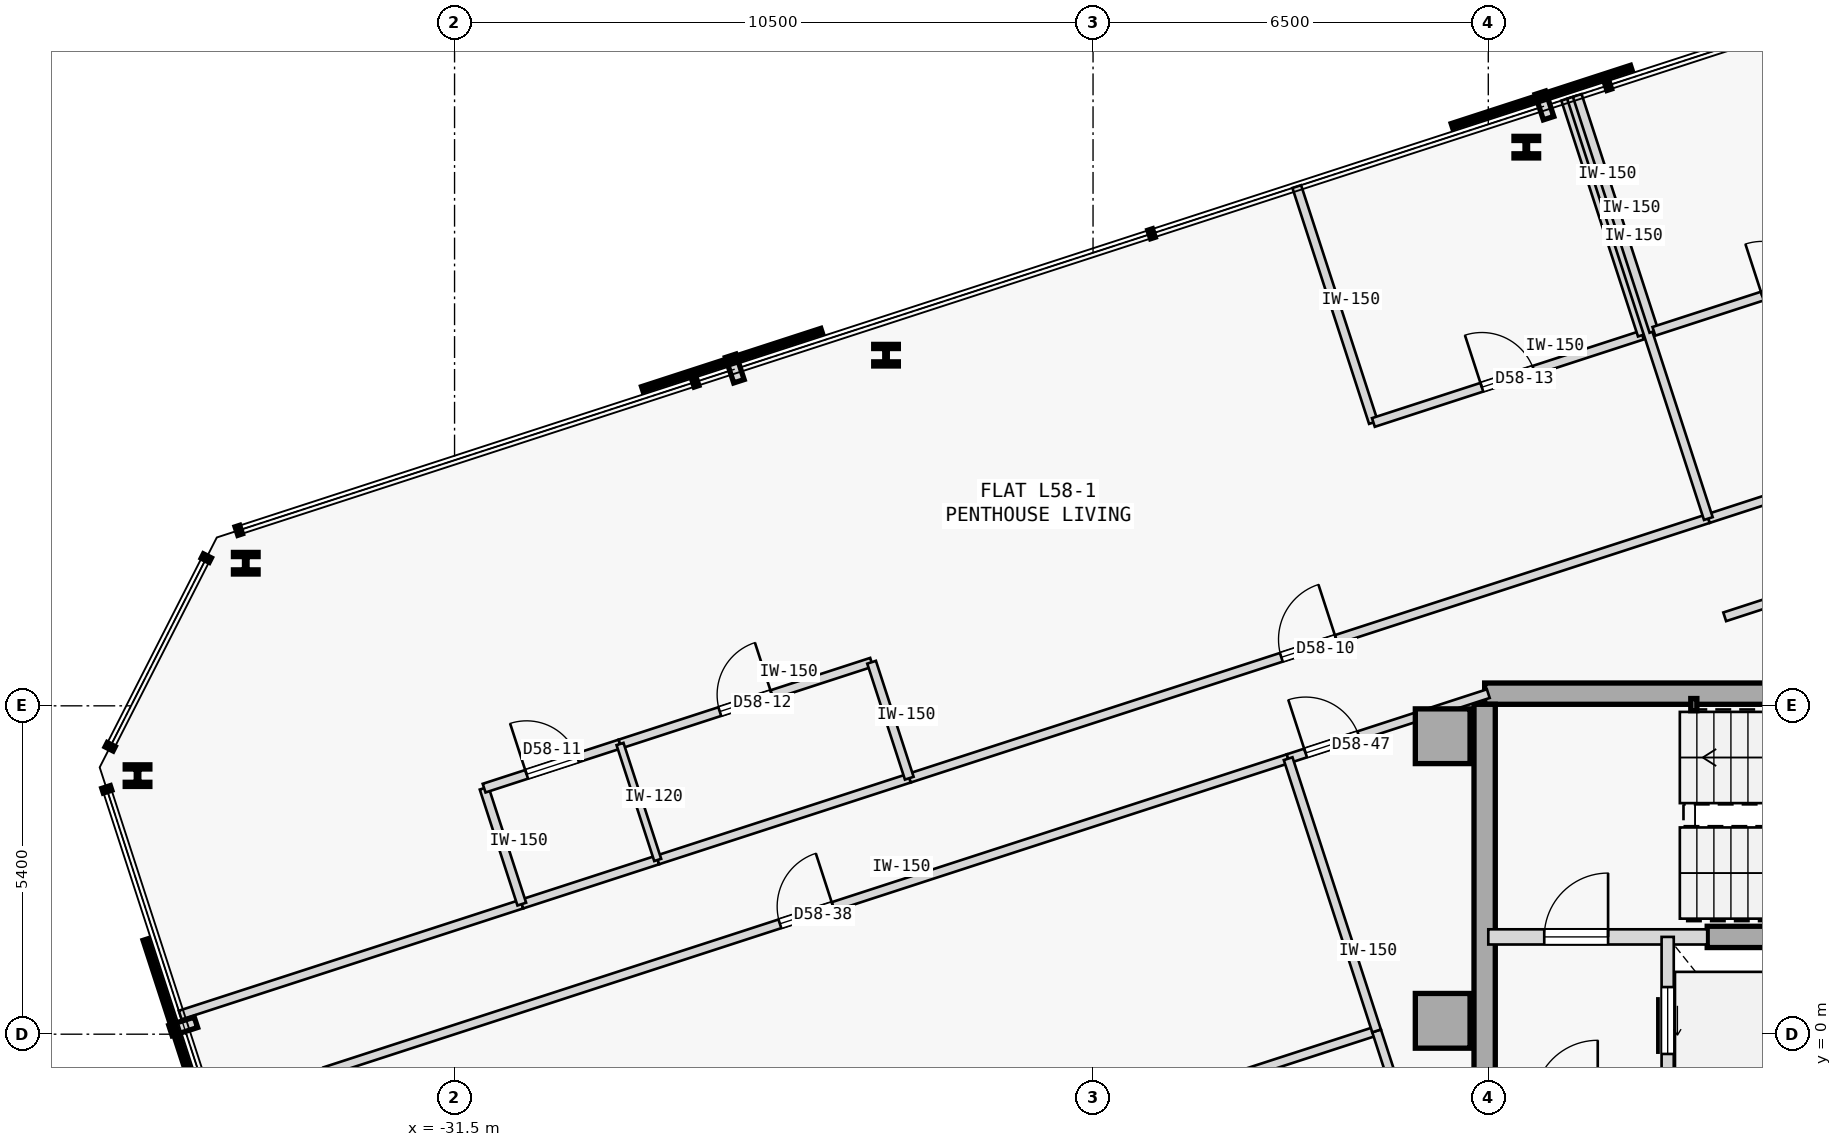
"""IFC4 building model, lengths in metres.
Left out: names, types, materials, properties, quantities, classifications, styles, units other than length and angle.
Written with IfcOpenShell. Run it as: python <this file> out.ifc"""

import sys

from ifc_helpers import new_model, si_unit, direction, frame, frame_2d, origin, origin_2d, place, context, subcontext, project, spatial, rectangle, hollow_rectangle, i_section, extrude, element, fill, save


model = new_model("IFC4")
c1 = context("Model", 3, precision=1e-05, world=origin(), true_north=direction((0.0, 1.0)))
c2 = subcontext(c1, "Body", "Model", "MODEL_VIEW")
j1 = project(units=[si_unit("LENGTHUNIT", "METRE"), si_unit("PLANEANGLEUNIT", "RADIAN")], contexts=[c1])
p1 = place(None, origin())
s1 = spatial("IfcSite", under=j1, at=p1, CompositionType="ELEMENT")
p2 = place(p1, origin())
s2 = spatial("IfcBuilding", under=s1, at=p2, CompositionType="ELEMENT")
p3 = place(p2, frame((0.0, 0.0, 220.95)))
s3 = spatial("IfcBuildingStorey", under=s2, at=p3, CompositionType="ELEMENT", Elevation=220.95)
for number, where, z_axis, x_axis in (
    (1, (-15.25, 4.9, 0.0), (0.0, 0.0, 1.0), (1.0, 0.0, 0.0)),
    (2, (-15.25, 0.22, 0.0), (0.0, 0.0, 1.0), (1.0, 0.0, 0.0)),
):
    element("IfcColumn", number, at=place(p3, frame(where, z_axis=z_axis, x_axis=x_axis)), inside=s3, PredefinedType="COLUMN", context=c2, shape_type="SweptSolid", body=[
        extrude(rectangle(XDim=0.9, YDim=0.9, at=origin_2d()), origin(), (0.0, 0.0, 1.0), 3.35),
    ])
p4 = place(p3, frame((-14.56, 5.6, 0.0), z_axis=(0.0, 0.0, 1.0), x_axis=(1.0, 0.0, 0.0)))
e3 = element("IfcWall", 3, at=p4, inside=s3, PredefinedType="SHEAR", context=c2, shape_type="SweptSolid", body=[
    extrude(rectangle(XDim=11.41, YDim=0.35, at=frame_2d((5.705, 0.0))), origin(), (0.0, 0.0, 1.0), 3.125),
])
p5 = place(p3, frame((-14.56, -5.425, 0.0), z_axis=(0.0, 0.0, 1.0), x_axis=(0.0, 1.0, 0.0)))
e4 = element("IfcWall", 4, at=p5, inside=s3, PredefinedType="SHEAR", context=c2, shape_type="SweptSolid", body=[
    extrude(rectangle(XDim=10.85, YDim=0.35, at=frame_2d((5.425, 0.0))), origin(), (0.0, 0.0, 1.0), 3.125),
])
p6 = place(p3, frame((-10.9, 1.6, 0.0), z_axis=(0.0, 0.0, 1.0), x_axis=(1.0, 0.0, 0.0)))
e5 = element("IfcWall", 5, at=p6, inside=s3, PredefinedType="SHEAR", context=c2, shape_type="SweptSolid", body=[
    extrude(rectangle(XDim=5.15, YDim=0.35, at=frame_2d((2.575, 0.0))), origin(), (0.0, 0.0, 1.0), 3.125),
])
p7 = place(p3, frame((-11.12, 5.42, 0.0), z_axis=(0.0, 0.0, 1.0), x_axis=(1.0, 0.0, 0.0)))
e6 = element("IfcColumn", 6, at=p7, inside=s3, PredefinedType="COLUMN", context=c2, shape_type="SweptSolid", body=[
    extrude(hollow_rectangle(XDim=0.1, YDim=0.2, WallThickness=0.008, at=origin_2d()), origin(), (0.0, 0.0, 1.0), 3.35),
])
for number, where, z_axis, x_axis in (
    (7, (-13.875, 14.587, 0.0), (0.0, 0.0, 1.0), (1.0, 0.0, 0.0)),
    (8, (-24.404, 11.166, 0.0), (0.0, 0.0, 1.0), (1.0, 0.0, 0.0)),
    (9, (-34.934, 7.745, 0.0), (0.0, 0.0, 1.0), (1.0, 0.0, 0.0)),
    (10, (-36.713, 4.252, 0.0), (0.0, 0.0, 1.0), (1.0, 0.0, 0.0)),
):
    element("IfcColumn", number, at=place(p3, frame(where, z_axis=z_axis, x_axis=x_axis)), inside=s3, PredefinedType="COLUMN", context=c2, shape_type="SweptSolid", body=[
        extrude(i_section(OverallWidth=0.405, OverallDepth=0.355, WebThickness=0.042, FlangeThickness=0.068, FilletRadius=0.015, at=origin_2d()), origin(), (0.0, 0.0, 1.0), 3.35),
    ])
p8 = place(p3, frame((-14.5, 1.6, 0.0), z_axis=(0.0, 0.0, 1.0), x_axis=(1.0, 0.0, 0.0)))
e11 = element("IfcWall", 11, at=p8, inside=s3, PredefinedType="STANDARD", context=c2, shape_type="SweptSolid", body=[
    extrude(rectangle(XDim=3.6, YDim=0.25, at=frame_2d((1.8, 0.0))), origin(), (0.0, 0.0, 1.0), 3.125),
])
p9 = place(p8, frame((0.92, 0.0, 0.0)))
e12 = element("IfcOpeningElement", 12, at=p9, cuts=e11, PredefinedType="OPENING", context=c2, shape_type="SweptSolid", body=[
    extrude(rectangle(XDim=1.05, YDim=2.15, at=frame_2d((0.525, 1.075))), frame((0.0, 0.135, 0.0), z_axis=(0.0, -1.0, 0.0), x_axis=(1.0, 0.0, 0.0)), (0.0, 0.0, 1.0), 0.27),
])
p10 = place(p3, frame((-11.55, -1.15, 0.0), z_axis=(0.0, 0.0, 1.0), x_axis=(0.0, 1.0, 0.0)))
e13 = element("IfcWall", 13, at=p10, inside=s3, PredefinedType="STANDARD", context=c2, shape_type="SweptSolid", body=[
    extrude(rectangle(XDim=2.75, YDim=0.2, at=frame_2d((1.375, 0.0))), origin(), (0.0, 0.0, 1.0), 3.125),
])
p11 = place(p10, frame((0.825, 0.0, 0.0)))
e14 = element("IfcOpeningElement", 14, at=p11, cuts=e13, PredefinedType="OPENING", context=c2, shape_type="SweptSolid", body=[
    extrude(rectangle(XDim=1.1, YDim=2.15, at=frame_2d((0.55, 1.075))), frame((0.0, 0.11, 0.0), z_axis=(0.0, -1.0, 0.0), x_axis=(1.0, 0.0, 0.0)), (0.0, 0.0, 1.0), 0.22),
])
p12 = place(p3, frame((-36.012, 0.314, 0.0), z_axis=(0.0, 0.0, 1.0), x_axis=(0.951065348244, 0.308989811111, 0.0)))
e15 = element("IfcWall", 15, at=p12, inside=s3, PredefinedType="PARTITIONING", context=c2, shape_type="SweptSolid", body=[
    extrude(rectangle(XDim=5.907, YDim=0.15, at=frame_2d((2.954, 0.0))), origin(), (0.0, 0.0, 1.0), 3.125),
])
p13 = place(p3, frame((-24.022, 4.21, 0.0), z_axis=(0.0, 0.0, 1.0), x_axis=(0.951058997127, 0.309009359055, 0.0)))
e16 = element("IfcWall", 16, at=p13, inside=s3, PredefinedType="PARTITIONING", context=c2, shape_type="SweptSolid", body=[
    extrude(rectangle(XDim=13.817, YDim=0.15, at=frame_2d((6.908, 0.0))), origin(), (0.0, 0.0, 1.0), 3.125),
])
p14 = place(p13, frame((6.434, 0.0, 0.0)))
e17 = element("IfcOpeningElement", 17, at=p14, cuts=e16, PredefinedType="OPENING", context=c2, shape_type="SweptSolid", body=[
    extrude(rectangle(XDim=0.95, YDim=2.15, at=frame_2d((0.475, 1.075))), frame((0.0, 0.085, 0.0), z_axis=(0.0, -1.0, 0.0), x_axis=(1.0, 0.0, 0.0)), (0.0, 0.0, 1.0), 0.17),
])
p15 = place(p3, frame((-30.394, 2.139, 0.0), z_axis=(0.0, 0.0, 1.0), x_axis=(0.951045519245, 0.309050837767, 0.0)))
e18 = element("IfcWall", 18, at=p15, inside=s3, PredefinedType="PARTITIONING", context=c2, shape_type="SweptSolid", body=[
    extrude(rectangle(XDim=2.35, YDim=0.15, at=frame_2d((1.175, 0.0))), origin(), (0.0, 0.0, 1.0), 3.125),
])
p16 = place(p3, frame((-28.159, 2.866, 0.0), z_axis=(0.0, 0.0, 1.0), x_axis=(0.951052627573, 0.309028962374, 0.0)))
e19 = element("IfcWall", 19, at=p16, inside=s3, PredefinedType="PARTITIONING", context=c2, shape_type="SweptSolid", body=[
    extrude(rectangle(XDim=4.35, YDim=0.15, at=frame_2d((2.175, 0.0))), origin(), (0.0, 0.0, 1.0), 3.125),
])
p17 = place(p3, frame((-10.882, 8.479, 0.0), z_axis=(0.0, 0.0, 1.0), x_axis=(0.951051887333, 0.309031240494, 0.0)))
e20 = element("IfcWall", 20, at=p17, inside=s3, PredefinedType="PARTITIONING", context=c2, shape_type="SweptSolid", body=[
    extrude(rectangle(XDim=7.551, YDim=0.15, at=frame_2d((3.775, 0.0))), origin(), (0.0, 0.0, 1.0), 3.125),
])
p18 = place(p3, frame((-33.633, -0.616, 0.0), z_axis=(0.0, 0.0, 1.0), x_axis=(0.951058192995, 0.309011833974, 0.0)))
e21 = element("IfcWall", 21, at=p18, inside=s3, PredefinedType="PARTITIONING", context=c2, shape_type="SweptSolid", body=[
    extrude(rectangle(XDim=16.657, YDim=0.15, at=frame_2d((8.329, 0.0))), origin(), (0.0, 0.0, 1.0), 3.125),
])
p19 = place(p18, frame((7.868, 0.0, 0.0)))
e22 = element("IfcOpeningElement", 22, at=p19, cuts=e21, PredefinedType="OPENING", context=c2, shape_type="SweptSolid", body=[
    extrude(rectangle(XDim=0.92, YDim=2.15, at=frame_2d((0.46, 1.075))), frame((0.0, 0.085, 0.0), z_axis=(0.0, -1.0, 0.0), x_axis=(1.0, 0.0, 0.0)), (0.0, 0.0, 1.0), 0.17),
])
p20 = place(p3, frame((-17.792, 4.531, 0.0), z_axis=(0.0, 0.0, 1.0), x_axis=(0.951047546178, 0.309044600193, 0.0)))
e23 = element("IfcWall", 23, at=p20, inside=s3, PredefinedType="PARTITIONING", context=c2, shape_type="SweptSolid", body=[
    extrude(rectangle(XDim=3.461, YDim=0.15, at=frame_2d((1.73, 0.0))), origin(), (0.0, 0.0, 1.0), 3.125),
])
p21 = place(p20, frame((0.302, 0.0, 0.0)))
e24 = element("IfcOpeningElement", 24, at=p21, cuts=e23, PredefinedType="OPENING", context=c2, shape_type="SweptSolid", body=[
    extrude(rectangle(XDim=0.92, YDim=2.15, at=frame_2d((0.46, 1.075))), frame((0.0, 0.085, 0.0), z_axis=(0.0, -1.0, 0.0), x_axis=(1.0, 0.0, 0.0)), (0.0, 0.0, 1.0), 0.17),
])
p22 = place(p3, frame((-10.612, 6.864, 0.0), z_axis=(0.0, 0.0, 1.0), x_axis=(0.951060972078, 0.309003280548, 0.0)))
e25 = element("IfcWall", 25, at=p22, inside=s3, PredefinedType="PARTITIONING", context=c2, shape_type="SweptSolid", body=[
    extrude(rectangle(XDim=7.268, YDim=0.15, at=frame_2d((3.634, 0.0))), origin(), (0.0, 0.0, 1.0), 3.125),
])
p23 = place(p22, frame((3.174, 0.0, 0.0)))
e26 = element("IfcOpeningElement", 26, at=p23, cuts=e25, PredefinedType="OPENING", context=c2, shape_type="SweptSolid", body=[
    extrude(rectangle(XDim=0.92, YDim=2.15, at=frame_2d((0.46, 1.075))), frame((0.0, 0.085, 0.0), z_axis=(0.0, -1.0, 0.0), x_axis=(1.0, 0.0, 0.0)), (0.0, 0.0, 1.0), 0.17),
])
p24 = place(p3, frame((-30.394, 2.139, 0.0), z_axis=(0.0, 0.0, 1.0), x_axis=(-0.309022749039, 0.951054646472, 0.0)))
e27 = element("IfcWall", 27, at=p24, inside=s3, PredefinedType="PARTITIONING", context=c2, shape_type="SweptSolid", body=[
    extrude(rectangle(XDim=2.005, YDim=0.15, at=frame_2d((1.002, 0.0))), origin(), (0.0, 0.0, 1.0), 3.125),
])
p25 = place(p3, frame((-31.014, 4.046, 0.0), z_axis=(0.0, 0.0, 1.0), x_axis=(0.951076048914, 0.308956872689, 0.0)))
e28 = element("IfcWall", 28, at=p25, inside=s3, PredefinedType="PARTITIONING", context=c2, shape_type="SweptSolid", body=[
    extrude(rectangle(XDim=2.35, YDim=0.15, at=frame_2d((1.175, 0.0))), origin(), (0.0, 0.0, 1.0), 3.125),
])
p26 = place(p25, frame((0.735, 0.0, 0.0)))
e29 = element("IfcOpeningElement", 29, at=p26, cuts=e28, PredefinedType="OPENING", context=c2, shape_type="SweptSolid", body=[
    extrude(rectangle(XDim=0.88, YDim=2.15, at=frame_2d((0.44, 1.075))), frame((0.0, 0.085, 0.0), z_axis=(0.0, -1.0, 0.0), x_axis=(1.0, 0.0, 0.0)), (0.0, 0.0, 1.0), 0.17),
])
p27 = place(p3, frame((-28.779, 4.772, 0.0), z_axis=(0.0, 0.0, 1.0), x_axis=(0.951052627573, 0.309028962374, 0.0)))
e30 = element("IfcWall", 30, at=p27, inside=s3, PredefinedType="PARTITIONING", context=c2, shape_type="SweptSolid", body=[
    extrude(rectangle(XDim=4.35, YDim=0.15, at=frame_2d((2.175, 0.0))), origin(), (0.0, 0.0, 1.0), 3.125),
])
p28 = place(p27, frame((1.725, 0.0, 0.0)))
e31 = element("IfcOpeningElement", 31, at=p28, cuts=e30, PredefinedType="OPENING", context=c2, shape_type="SweptSolid", body=[
    extrude(rectangle(XDim=0.9, YDim=2.15, at=frame_2d((0.45, 1.075))), frame((0.0, 0.085, 0.0), z_axis=(0.0, -1.0, 0.0), x_axis=(1.0, 0.0, 0.0)), (0.0, 0.0, 1.0), 0.17),
])
p29 = place(p3, frame((-24.022, 4.21, 0.0), z_axis=(0.0, 0.0, 1.0), x_axis=(-0.309058537449, 0.951043017129, 0.0)))
e32 = element("IfcWall", 32, at=p29, inside=s3, PredefinedType="PARTITIONING", context=c2, shape_type="SweptSolid", body=[
    extrude(rectangle(XDim=2.005, YDim=0.15, at=frame_2d((1.002, 0.0))), origin(), (0.0, 0.0, 1.0), 3.125),
])
p30 = place(p3, frame((-16.389, 10.06, 0.0), z_axis=(0.0, 0.0, 1.0), x_axis=(-0.309018403393, 0.951056058476, 0.0)))
e33 = element("IfcWall", 33, at=p30, inside=s3, PredefinedType="PARTITIONING", context=c2, shape_type="SweptSolid", body=[
    extrude(rectangle(XDim=4.079, YDim=0.15, at=frame_2d((2.04, 0.0))), origin(), (0.0, 0.0, 1.0), 3.125),
])
p31 = place(p3, frame((-16.389, 10.06, 0.0), z_axis=(0.0, 0.0, 1.0), x_axis=(0.951050272606, 0.309036209813, 0.0)))
e34 = element("IfcWall", 34, at=p31, inside=s3, PredefinedType="PARTITIONING", context=c2, shape_type="SweptSolid", body=[
    extrude(rectangle(XDim=4.65, YDim=0.15, at=frame_2d((2.325, 0.0))), origin(), (0.0, 0.0, 1.0), 3.125),
])
p32 = place(p31, frame((1.875, 0.0, 0.0)))
e35 = element("IfcOpeningElement", 35, at=p32, cuts=e34, PredefinedType="OPENING", context=c2, shape_type="SweptSolid", body=[
    extrude(rectangle(XDim=0.9, YDim=2.15, at=frame_2d((0.45, 1.075))), frame((0.0, 0.085, 0.0), z_axis=(0.0, -1.0, 0.0), x_axis=(1.0, 0.0, 0.0)), (0.0, 0.0, 1.0), 0.17),
])
p33 = place(p3, frame((-11.967, 11.497, 0.0), z_axis=(0.0, 0.0, 1.0), x_axis=(-0.309018403393, 0.951056058476, 0.0)))
e36 = element("IfcWall", 36, at=p33, inside=s3, PredefinedType="PARTITIONING", context=c2, shape_type="SweptSolid", body=[
    extrude(rectangle(XDim=4.079, YDim=0.15, at=frame_2d((2.04, 0.0))), origin(), (0.0, 0.0, 1.0), 3.125),
])
p34 = place(p3, frame((-10.882, 8.479, 0.0), z_axis=(0.0, 0.0, 1.0), x_axis=(-0.308998913866, 0.951062390819, 0.0)))
e37 = element("IfcWall", 37, at=p34, inside=s3, PredefinedType="PARTITIONING", context=c2, shape_type="SweptSolid", body=[
    extrude(rectangle(XDim=7.284, YDim=0.15, at=frame_2d((3.642, 0.0))), origin(), (0.0, 0.0, 1.0), 3.125),
])
p35 = place(p3, frame((-28.159, 2.866, 0.0), z_axis=(0.0, 0.0, 1.0), x_axis=(-0.309058537449, 0.951043017129, 0.0)))
e38 = element("IfcWall", 38, at=p35, inside=s3, PredefinedType="PARTITIONING", context=c2, shape_type="SweptSolid", body=[
    extrude(rectangle(XDim=2.005, YDim=0.12, at=frame_2d((1.002, 0.0))), origin(), (0.0, 0.0, 1.0), 3.125),
])
p36 = place(p3, frame((-11.777, 11.559, 0.0), z_axis=(0.0, 0.0, 1.0), x_axis=(-0.309018403393, 0.951056058476, 0.0)))
e39 = element("IfcWall", 39, at=p36, inside=s3, PredefinedType="PARTITIONING", context=c2, shape_type="SweptSolid", body=[
    extrude(rectangle(XDim=4.079, YDim=0.15, at=frame_2d((2.04, 0.0))), origin(), (0.0, 0.0, 1.0), 3.125),
])
p37 = place(p3, frame((-11.777, 11.559, 0.0), z_axis=(0.0, 0.0, 1.0), x_axis=(0.951050272606, 0.309036209813, 0.0)))
e40 = element("IfcWall", 40, at=p37, inside=s3, PredefinedType="PARTITIONING", context=c2, shape_type="SweptSolid", body=[
    extrude(rectangle(XDim=4.65, YDim=0.15, at=frame_2d((2.325, 0.0))), origin(), (0.0, 0.0, 1.0), 3.125),
])
p38 = place(p37, frame((1.875, 0.0, 0.0)))
e41 = element("IfcOpeningElement", 41, at=p38, cuts=e40, PredefinedType="OPENING", context=c2, shape_type="SweptSolid", body=[
    extrude(rectangle(XDim=0.9, YDim=2.15, at=frame_2d((0.45, 1.075))), frame((0.0, 0.085, 0.0), z_axis=(0.0, -1.0, 0.0), x_axis=(1.0, 0.0, 0.0)), (0.0, 0.0, 1.0), 0.17),
])
p39 = place(p3, frame((-32.179, -5.093, 0.0), z_axis=(0.0, 0.0, 1.0), x_axis=(0.951053885426, 0.309025091239, 0.0)))
e42 = element("IfcWall", 42, at=p39, inside=s3, PredefinedType="PARTITIONING", context=c2, shape_type="SweptSolid", body=[
    extrude(rectangle(XDim=16.657, YDim=0.15, at=frame_2d((8.329, 0.0))), origin(), (0.0, 0.0, 1.0), 3.125),
])
p40 = place(p3, frame((-15.685, -1.952, 0.0), z_axis=(0.0, 0.0, 1.0), x_axis=(-0.308929092959, 0.951085072706, 0.0)))
e43 = element("IfcWall", 43, at=p40, inside=s3, PredefinedType="PARTITIONING", context=c2, shape_type="SweptSolid", body=[
    extrude(rectangle(XDim=2.11, YDim=0.15, at=frame_2d((1.055, 0.0))), origin(), (0.0, 0.0, 1.0), 3.125),
])
p41 = place(p3, frame((-16.337, 0.054, 0.0), z_axis=(0.0, 0.0, 1.0), x_axis=(-0.309029776355, 0.951052363083, 0.0)))
e44 = element("IfcWall", 44, at=p41, inside=s3, PredefinedType="PARTITIONING", context=c2, shape_type="SweptSolid", body=[
    extrude(rectangle(XDim=4.707, YDim=0.15, at=frame_2d((2.354, 0.0))), origin(), (0.0, 0.0, 1.0), 3.125),
])
p42 = place(p9, origin())
e45 = element("IfcDoor", 45, at=p42, inside=s3, OperationType="SINGLE_SWING_RIGHT", PredefinedType="DOOR", context=c2, shape_type="SweptSolid", body=[
    extrude(rectangle(XDim=1.05, YDim=2.15, at=frame_2d((0.525, 1.075))), frame((0.0, 0.025, 0.0), z_axis=(0.0, -1.0, 0.0), x_axis=(1.0, 0.0, 0.0)), (0.0, 0.0, 1.0), 0.05),
])
fill(e12, e45)
p43 = place(p11, origin())
e46 = element("IfcDoor", 46, at=p43, inside=s3, OperationType="SLIDING_TO_RIGHT", PredefinedType="DOOR", context=c2, shape_type="SweptSolid", body=[
    extrude(rectangle(XDim=1.1, YDim=2.15, at=frame_2d((0.55, 1.075))), frame((0.0, 0.025, 0.0), z_axis=(0.0, -1.0, 0.0), x_axis=(1.0, 0.0, 0.0)), (0.0, 0.0, 1.0), 0.05),
])
fill(e14, e46)
p44 = place(p14, origin())
e47 = element("IfcDoor", 47, at=p44, inside=s3, OperationType="SINGLE_SWING_RIGHT", PredefinedType="DOOR", context=c2, shape_type="SweptSolid", body=[
    extrude(rectangle(XDim=0.95, YDim=2.15, at=frame_2d((0.475, 1.075))), frame((0.0, 0.025, 0.0), z_axis=(0.0, -1.0, 0.0), x_axis=(1.0, 0.0, 0.0)), (0.0, 0.0, 1.0), 0.05),
])
fill(e17, e47)
p45 = place(p26, origin())
e48 = element("IfcDoor", 48, at=p45, inside=s3, OperationType="SINGLE_SWING_LEFT", PredefinedType="DOOR", context=c2, shape_type="SweptSolid", body=[
    extrude(rectangle(XDim=0.88, YDim=2.15, at=frame_2d((0.44, 1.075))), frame((0.0, 0.025, 0.0), z_axis=(0.0, -1.0, 0.0), x_axis=(1.0, 0.0, 0.0)), (0.0, 0.0, 1.0), 0.05),
])
fill(e29, e48)
p46 = place(p28, origin())
e49 = element("IfcDoor", 49, at=p46, inside=s3, OperationType="SINGLE_SWING_RIGHT", PredefinedType="DOOR", context=c2, shape_type="SweptSolid", body=[
    extrude(rectangle(XDim=0.9, YDim=2.15, at=frame_2d((0.45, 1.075))), frame((0.0, 0.025, 0.0), z_axis=(0.0, -1.0, 0.0), x_axis=(1.0, 0.0, 0.0)), (0.0, 0.0, 1.0), 0.05),
])
fill(e31, e49)
p47 = place(p32, origin())
e50 = element("IfcDoor", 50, at=p47, inside=s3, OperationType="SINGLE_SWING_LEFT", PredefinedType="DOOR", context=c2, shape_type="SweptSolid", body=[
    extrude(rectangle(XDim=0.9, YDim=2.15, at=frame_2d((0.45, 1.075))), frame((0.0, 0.025, 0.0), z_axis=(0.0, -1.0, 0.0), x_axis=(1.0, 0.0, 0.0)), (0.0, 0.0, 1.0), 0.05),
])
fill(e35, e50)
p48 = place(p38, origin())
e51 = element("IfcDoor", 51, at=p48, inside=s3, OperationType="SINGLE_SWING_LEFT", PredefinedType="DOOR", context=c2, shape_type="SweptSolid", body=[
    extrude(rectangle(XDim=0.9, YDim=2.15, at=frame_2d((0.45, 1.075))), frame((0.0, 0.025, 0.0), z_axis=(0.0, -1.0, 0.0), x_axis=(1.0, 0.0, 0.0)), (0.0, 0.0, 1.0), 0.05),
])
fill(e41, e51)
p49 = place(p19, origin())
e52 = element("IfcDoor", 52, at=p49, inside=s3, OperationType="SINGLE_SWING_RIGHT", PredefinedType="DOOR", context=c2, shape_type="SweptSolid", body=[
    extrude(rectangle(XDim=0.92, YDim=2.15, at=frame_2d((0.46, 1.075))), frame((0.0, 0.025, 0.0), z_axis=(0.0, -1.0, 0.0), x_axis=(1.0, 0.0, 0.0)), (0.0, 0.0, 1.0), 0.05),
])
fill(e22, e52)
p50 = place(p21, origin())
e53 = element("IfcDoor", 53, at=p50, inside=s3, OperationType="SINGLE_SWING_LEFT", PredefinedType="DOOR", context=c2, shape_type="SweptSolid", body=[
    extrude(rectangle(XDim=0.92, YDim=2.15, at=frame_2d((0.46, 1.075))), frame((0.0, 0.025, 0.0), z_axis=(0.0, -1.0, 0.0), x_axis=(1.0, 0.0, 0.0)), (0.0, 0.0, 1.0), 0.05),
])
fill(e24, e53)
save(model, sys.argv[1])
